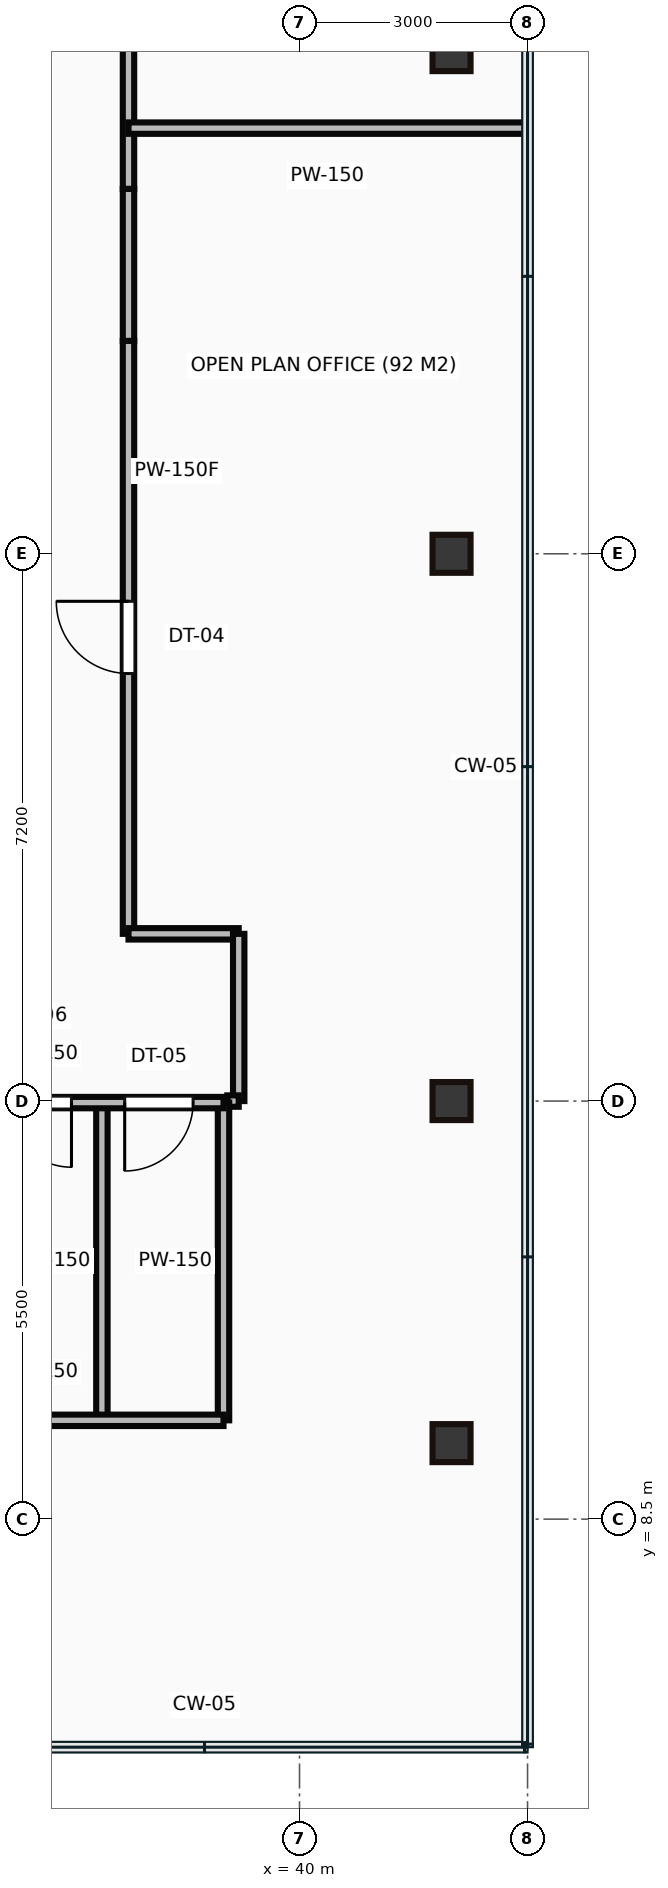
"""IFC4 building model, lengths in metres.
Left out: names, types, materials, properties, quantities, classifications, styles, units other than length and angle.
Written with IfcOpenShell. Run it as: python <this file> out.ifc"""

import sys

from ifc_helpers import new_model, si_unit, direction, frame, frame_2d, origin, origin_2d, place, context, subcontext, project, spatial, rectangle, hollow_rectangle, extrude, source, transform, mapped, element, fill, save


model = new_model("IFC4")
c1 = context("Model", 3, precision=1e-05, world=origin(), true_north=direction((0.0, 1.0)))
c2 = subcontext(c1, "Body", "Model", "MODEL_VIEW")
j1 = project(units=[si_unit("LENGTHUNIT", "METRE"), si_unit("PLANEANGLEUNIT", "RADIAN")], contexts=[c1])
p1 = place(None, origin())
s1 = spatial("IfcSite", under=j1, at=p1, CompositionType="ELEMENT")
p2 = place(p1, origin())
s2 = spatial("IfcBuilding", under=s1, at=p2, CompositionType="ELEMENT")
p3 = place(p2, frame((0.0, 0.0, 244.2)))
s3 = spatial("IfcBuildingStorey", under=s2, at=p3, CompositionType="ELEMENT", Elevation=244.2)
m1 = source(origin(), c2, "Body", "SweptSolid", [
    extrude(hollow_rectangle(XDim=0.5, YDim=0.5, WallThickness=0.022, at=origin_2d()), origin(), (0.0, 0.0, 1.0), 3.65),
])
for number, where, z_axis, x_axis in (
    (1, (42.0, 9.5, 0.0), (0.0, 0.0, 1.0), (1.0, 0.0, 0.0)),
    (2, (42.0, 14.0, 0.0), (0.0, 0.0, 1.0), (1.0, 0.0, 0.0)),
    (3, (42.0, 21.2, 0.0), (0.0, 0.0, 1.0), (1.0, 0.0, 0.0)),
    (4, (42.0, 27.8, 0.0), (0.0, 0.0, 1.0), (1.0, 0.0, 0.0)),
):
    element("IfcColumn", number, at=place(p3, frame(where, z_axis=z_axis, x_axis=x_axis)), inside=s3, PredefinedType="COLUMN", context=c2, shape_type="MappedRepresentation", body=[
        mapped(m1, transform((0.0, 0.0, 0.0))),
    ])
m2 = source(origin(), c2, "Body", "SweptSolid", [
    extrude(rectangle(XDim=4.8, YDim=0.15, at=frame_2d((2.4, 0.0))), origin(), (0.0, 0.0, 1.0), 2.787),
])
p4 = place(p3, frame((34.2, 13.98, 0.0), z_axis=(0.0, 0.0, 1.0), x_axis=(1.0, 0.0, 0.0)))
e5 = element("IfcWall", 5, at=p4, inside=s3, PredefinedType="PARTITIONING", context=c2, shape_type="MappedRepresentation", body=[
    mapped(m2, transform((0.0, 0.0, 0.0))),
])
p5 = place(p4, frame((0.35, 0.0, 0.0)))
e6 = element("IfcOpeningElement", 6, at=p5, cuts=e5, PredefinedType="OPENING", context=c2, shape_type="SweptSolid", body=[
    extrude(rectangle(XDim=0.85, YDim=2.1, at=frame_2d((0.425, 1.05))), frame((0.0, 0.085, 0.0), z_axis=(0.0, -1.0, 0.0), x_axis=(1.0, 0.0, 0.0)), (0.0, 0.0, 1.0), 0.17),
])
p6 = place(p4, frame((1.95, 0.0, 0.0)))
e7 = element("IfcOpeningElement", 7, at=p6, cuts=e5, PredefinedType="OPENING", context=c2, shape_type="SweptSolid", body=[
    extrude(rectangle(XDim=0.85, YDim=2.1, at=frame_2d((0.425, 1.05))), frame((0.0, 0.085, 0.0), z_axis=(0.0, -1.0, 0.0), x_axis=(1.0, 0.0, 0.0)), (0.0, 0.0, 1.0), 0.17),
])
p7 = place(p4, frame((3.5, 0.0, 0.0)))
e8 = element("IfcOpeningElement", 8, at=p7, cuts=e5, PredefinedType="OPENING", context=c2, shape_type="SweptSolid", body=[
    extrude(rectangle(XDim=0.9, YDim=2.1, at=frame_2d((0.45, 1.05))), frame((0.0, 0.085, 0.0), z_axis=(0.0, -1.0, 0.0), x_axis=(1.0, 0.0, 0.0)), (0.0, 0.0, 1.0), 0.17),
])
m3 = source(origin(), c2, "Body", "SweptSolid", [
    extrude(rectangle(XDim=4.8, YDim=0.15, at=frame_2d((2.4, 0.0))), origin(), (0.0, 0.0, 1.0), 3.4),
])
p8 = place(p3, frame((34.2, 9.8, 0.0), z_axis=(0.0, 0.0, 1.0), x_axis=(1.0, 0.0, 0.0)))
e9 = element("IfcWall", 9, at=p8, inside=s3, PredefinedType="PARTITIONING", context=c2, shape_type="MappedRepresentation", body=[
    mapped(m3, transform((0.0, 0.0, 0.0))),
])
m4 = source(origin(), c2, "Body", "SweptSolid", [
    extrude(rectangle(XDim=4.18, YDim=0.15, at=frame_2d((2.09, 0.0))), origin(), (0.0, 0.0, 1.0), 3.4),
])
for number, where, z_axis, x_axis in (
    (10, (39.0, 9.8, 0.0), (0.0, 0.0, 1.0), (0.0, 1.0, 0.0)),
    (11, (37.4, 9.8, 0.0), (0.0, 0.0, 1.0), (0.0, 1.0, 0.0)),
):
    element("IfcWall", number, at=place(p3, frame(where, z_axis=z_axis, x_axis=x_axis)), inside=s3, PredefinedType="PARTITIONING", context=c2, shape_type="MappedRepresentation", body=[
        mapped(m4, transform((0.0, 0.0, 0.0))),
    ])
m5 = source(origin(), c2, "Body", "SweptSolid", [
    extrude(rectangle(XDim=6.8, YDim=0.15, at=frame_2d((3.4, 0.0))), origin(), (0.0, 0.0, 1.0), 3.4),
])
p9 = place(p3, frame((37.75, 32.8, 0.0), z_axis=(0.0, 0.0, 1.0), x_axis=(0.0, -1.0, 0.0)))
e12 = element("IfcWall", 12, at=p9, inside=s3, PredefinedType="PARTITIONING", context=c2, shape_type="MappedRepresentation", body=[
    mapped(m5, transform((0.0, 0.0, 0.0))),
])
m6 = source(origin(), c2, "Body", "SweptSolid", [
    extrude(rectangle(XDim=2.0, YDim=0.15, at=frame_2d((1.0, 0.0))), origin(), (0.0, 0.0, 1.0), 3.4),
])
p10 = place(p3, frame((37.75, 26.0, 0.0), z_axis=(0.0, 0.0, 1.0), x_axis=(0.0, -1.0, 0.0)))
e13 = element("IfcWall", 13, at=p10, inside=s3, PredefinedType="PARTITIONING", context=c2, shape_type="MappedRepresentation", body=[
    mapped(m6, transform((0.0, 0.0, 0.0))),
])
m7 = source(origin(), c2, "Body", "SweptSolid", [
    extrude(rectangle(XDim=7.8, YDim=0.15, at=frame_2d((3.9, 0.0))), origin(), (0.0, 0.0, 1.0), 3.4),
])
p11 = place(p3, frame((37.75, 24.0, 0.0), z_axis=(0.0, 0.0, 1.0), x_axis=(0.0, -1.0, 0.0)))
e14 = element("IfcWall", 14, at=p11, inside=s3, PredefinedType="PARTITIONING", context=c2, shape_type="MappedRepresentation", body=[
    mapped(m7, transform((0.0, 0.0, 0.0))),
])
p12 = place(p11, frame((3.425, 0.0, 0.0)))
e15 = element("IfcOpeningElement", 15, at=p12, cuts=e14, PredefinedType="OPENING", context=c2, shape_type="SweptSolid", body=[
    extrude(rectangle(XDim=0.95, YDim=2.15, at=frame_2d((0.475, 1.075))), frame((0.0, 0.085, 0.0), z_axis=(0.0, -1.0, 0.0), x_axis=(1.0, 0.0, 0.0)), (0.0, 0.0, 1.0), 0.17),
])
m8 = source(origin(), c2, "Body", "SweptSolid", [
    extrude(rectangle(XDim=1.45, YDim=0.15, at=frame_2d((0.725, 0.0))), origin(), (0.0, 0.0, 1.0), 3.4),
])
p13 = place(p3, frame((37.75, 16.2, 0.0), z_axis=(0.0, 0.0, 1.0), x_axis=(1.0, 0.0, 0.0)))
e16 = element("IfcWall", 16, at=p13, inside=s3, PredefinedType="PARTITIONING", context=c2, shape_type="MappedRepresentation", body=[
    mapped(m8, transform((0.0, 0.0, 0.0))),
])
m9 = source(origin(), c2, "Body", "SweptSolid", [
    extrude(rectangle(XDim=2.2, YDim=0.15, at=frame_2d((1.1, 0.0))), origin(), (0.0, 0.0, 1.0), 3.4),
])
p14 = place(p3, frame((39.2, 16.2, 0.0), z_axis=(0.0, 0.0, 1.0), x_axis=(0.0, -1.0, 0.0)))
e17 = element("IfcWall", 17, at=p14, inside=s3, PredefinedType="PARTITIONING", context=c2, shape_type="MappedRepresentation", body=[
    mapped(m9, transform((0.0, 0.0, 0.0))),
])
m10 = source(origin(), c2, "Body", "SweptSolid", [
    extrude(rectangle(XDim=0.15, YDim=0.15, at=frame_2d((0.075, 0.0))), origin(), (0.0, 0.0, 1.0), 3.4),
])
p15 = place(p3, frame((39.2, 14.0, 0.0), z_axis=(0.0, 0.0, 1.0), x_axis=(-1.0, 0.0, 0.0)))
e18 = element("IfcWall", 18, at=p15, inside=s3, PredefinedType="PARTITIONING", context=c2, shape_type="MappedRepresentation", body=[
    mapped(m10, transform((0.0, 0.0, 0.0))),
])
m11 = source(origin(), c2, "Body", "SweptSolid", [
    extrude(rectangle(XDim=5.23, YDim=0.15, at=frame_2d((2.615, 0.0))), origin(), (0.0, 0.0, 1.0), 3.4),
])
p16 = place(p3, frame((42.98, 26.8, 0.0), z_axis=(0.0, 0.0, 1.0), x_axis=(-1.0, 0.0, 0.0)))
e19 = element("IfcWall", 19, at=p16, inside=s3, PredefinedType="PARTITIONING", context=c2, shape_type="MappedRepresentation", body=[
    mapped(m11, transform((0.0, 0.0, 0.0))),
])
m12 = source(origin(), c2, "Body", "SweptSolid", [
    extrude(rectangle(XDim=0.85, YDim=2.1, at=frame_2d((0.425, 1.05))), frame((0.0, 0.025, 0.0), z_axis=(0.0, -1.0, 0.0), x_axis=(1.0, 0.0, 0.0)), (0.0, 0.0, 1.0), 0.05),
])
p17 = place(p6, frame((0.85, 0.0, 0.0), z_axis=(0.0, 0.0, 1.0), x_axis=(-1.0, 0.0, 0.0)))
e20 = element("IfcDoor", 20, at=p17, inside=s3, OperationType="SINGLE_SWING_RIGHT", PredefinedType="DOOR", context=c2, shape_type="MappedRepresentation", body=[
    mapped(m12, transform((0.0, 0.0, 0.0))),
])
fill(e7, e20)
m13 = source(origin(), c2, "Body", "SweptSolid", [
    extrude(rectangle(XDim=0.9, YDim=2.1, at=frame_2d((0.45, 1.05))), frame((0.0, 0.025, 0.0), z_axis=(0.0, -1.0, 0.0), x_axis=(1.0, 0.0, 0.0)), (0.0, 0.0, 1.0), 0.05),
])
p18 = place(p7, frame((0.9, 0.0, 0.0), z_axis=(0.0, 0.0, 1.0), x_axis=(-1.0, 0.0, 0.0)))
e21 = element("IfcDoor", 21, at=p18, inside=s3, OperationType="SINGLE_SWING_LEFT", PredefinedType="DOOR", context=c2, shape_type="MappedRepresentation", body=[
    mapped(m13, transform((0.0, 0.0, 0.0))),
])
fill(e8, e21)
m14 = source(origin(), c2, "Body", "SweptSolid", [
    extrude(rectangle(XDim=0.95, YDim=2.15, at=frame_2d((0.475, 1.075))), frame((0.0, 0.025, 0.0), z_axis=(0.0, -1.0, 0.0), x_axis=(1.0, 0.0, 0.0)), (0.0, 0.0, 1.0), 0.05),
])
p19 = place(p12, origin())
e22 = element("IfcDoor", 22, at=p19, inside=s3, OperationType="SINGLE_SWING_LEFT", PredefinedType="DOOR", context=c2, shape_type="MappedRepresentation", body=[
    mapped(m14, transform((0.0, 0.0, 0.0))),
])
fill(e15, e22)
save(model, sys.argv[1])
